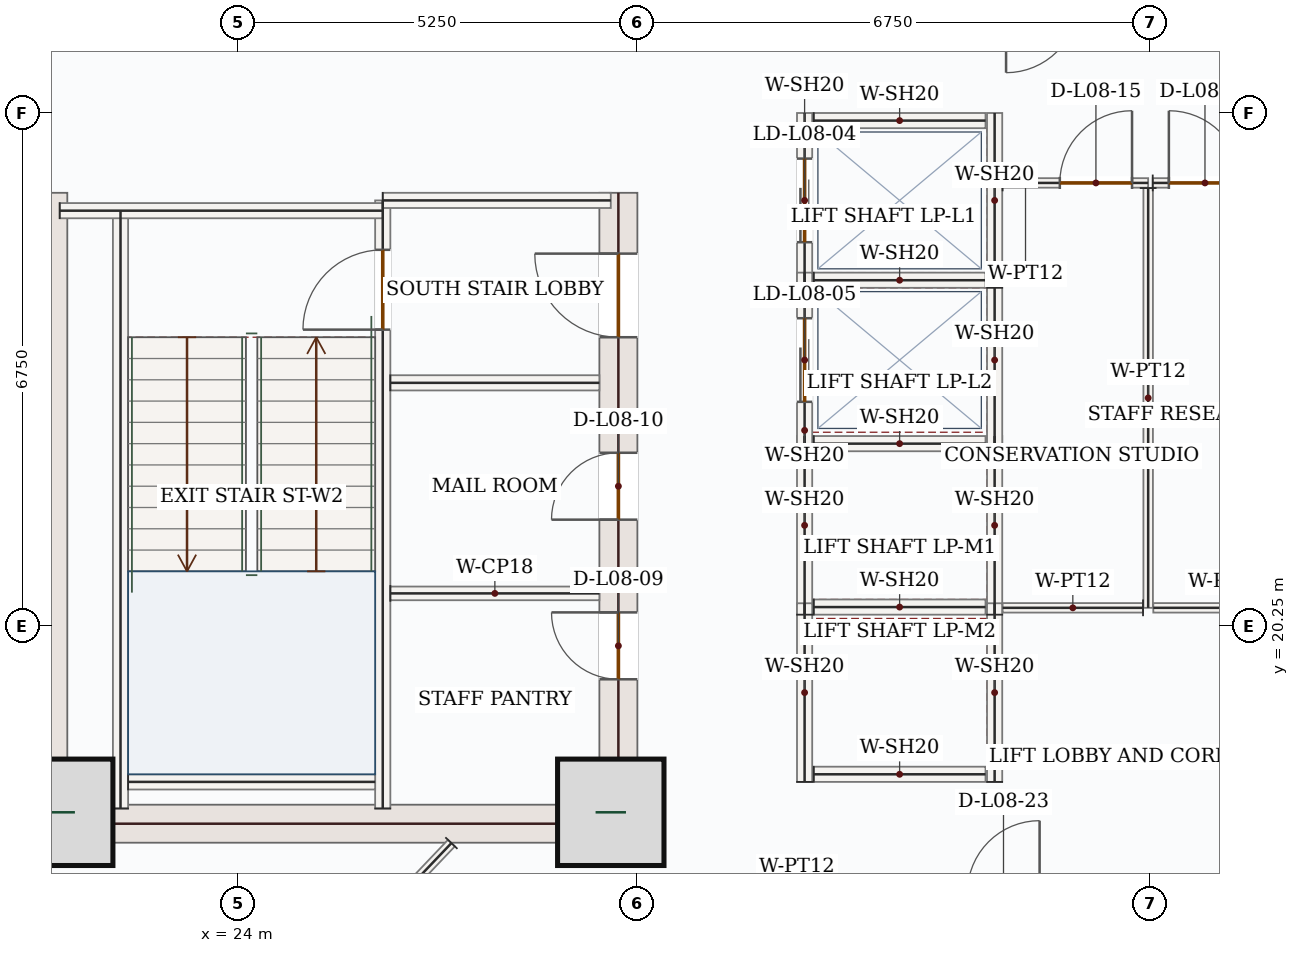
"""IFC4 building model, lengths in metres.
Left out: names, types, materials, properties, quantities, classifications, styles, units other than length and angle.
Written with IfcOpenShell. Run it as: python <this file> out.ifc"""

import sys

from ifc_helpers import new_model, si_unit, direction, frame, frame_2d, origin, origin_2d, place, context, subcontext, project, spatial, rectangle, extrude, source, transform, mapped, element, fill, save


model = new_model("IFC4")
c1 = context("Model", 3, precision=1e-05, world=origin(), true_north=direction((0.0, 1.0)))
c2 = subcontext(c1, "Body", "Model", "MODEL_VIEW")
j1 = project(units=[si_unit("LENGTHUNIT", "METRE"), si_unit("PLANEANGLEUNIT", "RADIAN")], contexts=[c1])
p1 = place(None, origin())
s1 = spatial("IfcSite", under=j1, at=p1, CompositionType="ELEMENT")
p2 = place(p1, origin())
s2 = spatial("IfcBuilding", under=s1, at=p2, CompositionType="ELEMENT")
p3 = place(p2, frame((0.0, 0.0, 41.7)))
s3 = spatial("IfcBuildingStorey", under=s2, at=p3, CompositionType="ELEMENT", Elevation=41.7)
m1 = source(origin(), c2, "Body", "SweptSolid", [
    extrude(rectangle(XDim=8.55, YDim=0.5, at=frame_2d((4.275, 0.0))), origin(), (0.0, 0.0, 1.0), 3.95),
])
p4 = place(p3, frame((21.5, 17.4, 0.0), z_axis=(0.0, 0.0, 1.0), x_axis=(0.0, 1.0, 0.0)))
e1 = element("IfcWall", 1, at=p4, inside=s3, PredefinedType="SHEAR", context=c2, shape_type="MappedRepresentation", body=[
    mapped(m1, transform((0.0, 0.0, 0.0), x_axis=(1.0, 0.0, 0.0), y_axis=(0.0, 1.0, 0.0), z_axis=(0.0, 0.0, 1.0), scale=1.0)),
])
p5 = place(p3, frame((29.0, 17.4, 0.0), z_axis=(0.0, 0.0, 1.0), x_axis=(0.0, 1.0, 0.0)))
e2 = element("IfcWall", 2, at=p5, inside=s3, PredefinedType="SHEAR", context=c2, shape_type="SweptSolid", body=[
    extrude(rectangle(XDim=8.55, YDim=0.5, at=frame_2d((4.275, 0.0))), origin(), (0.0, 0.0, 1.0), 3.95),
])
p6 = place(p5, frame((6.65, 0.0, 0.0)))
e3 = element("IfcOpeningElement", 3, at=p6, cuts=e2, PredefinedType="OPENING", context=c2, shape_type="SweptSolid", body=[
    extrude(rectangle(XDim=1.1, YDim=2.2, at=frame_2d((0.55, 1.1))), frame((0.0, 0.26, 0.0), z_axis=(0.0, -1.0, 0.0), x_axis=(1.0, 0.0, 0.0)), (0.0, 0.0, 1.0), 0.52),
])
p7 = place(p5, frame((2.15, 0.0, 0.0)))
e4 = element("IfcOpeningElement", 4, at=p7, cuts=e2, PredefinedType="OPENING", context=c2, shape_type="SweptSolid", body=[
    extrude(rectangle(XDim=0.88, YDim=2.1, at=frame_2d((0.44, 1.05))), frame((0.0, 0.26, 0.0), z_axis=(0.0, -1.0, 0.0), x_axis=(1.0, 0.0, 0.0)), (0.0, 0.0, 1.0), 0.52),
])
p8 = place(p5, frame((4.25, 0.0, 0.0)))
e5 = element("IfcOpeningElement", 5, at=p8, cuts=e2, PredefinedType="OPENING", context=c2, shape_type="SweptSolid", body=[
    extrude(rectangle(XDim=0.88, YDim=2.1, at=frame_2d((0.44, 1.05))), frame((0.0, 0.26, 0.0), z_axis=(0.0, -1.0, 0.0), x_axis=(1.0, 0.0, 0.0)), (0.0, 0.0, 1.0), 0.52),
])
m2 = source(origin(), c2, "Body", "SweptSolid", [
    extrude(rectangle(XDim=7.0, YDim=0.5, at=frame_2d((3.5, 0.0))), origin(), (0.0, 0.0, 1.0), 3.95),
])
p9 = place(p3, frame((21.75, 17.65, 0.0), z_axis=(0.0, 0.0, 1.0), x_axis=(1.0, 0.0, 0.0)))
e6 = element("IfcWall", 6, at=p9, inside=s3, PredefinedType="SHEAR", context=c2, shape_type="MappedRepresentation", body=[
    mapped(m2, transform((0.0, 0.0, 0.0), x_axis=(1.0, 0.0, 0.0), y_axis=(0.0, 1.0, 0.0), z_axis=(0.0, 0.0, 1.0), scale=1.0)),
])
m3 = source(origin(), c2, "Body", "SweptSolid", [
    extrude(rectangle(XDim=1.4, YDim=1.4, at=origin_2d()), origin(), (0.0, 0.0, 1.0), 4.2),
])
for number, where, z_axis, x_axis in (
    (7, (21.65, 17.8, 0.0), (0.0, 0.0, 1.0), (1.0, 0.0, 0.0)),
    (8, (28.9, 17.8, 0.0), (0.0, 0.0, 1.0), (1.0, 0.0, 0.0)),
):
    element("IfcColumn", number, at=place(p3, frame(where, z_axis=z_axis, x_axis=x_axis)), inside=s3, PredefinedType="COLUMN", context=c2, shape_type="MappedRepresentation", body=[
        mapped(m3, transform((0.0, 0.0, 0.0), x_axis=(1.0, 0.0, 0.0), y_axis=(0.0, 1.0, 0.0), z_axis=(0.0, 0.0, 1.0), scale=1.0)),
    ])
p10 = place(p3, frame((22.658, 14.74, 0.0), z_axis=(0.0, 0.0, 1.0), x_axis=(-0.707106781187, 0.707106781187, 0.0)))
e9 = element("IfcWall", 9, at=p10, inside=s3, PredefinedType="SOLIDWALL", context=c2, shape_type="SweptSolid", body=[
    extrude(rectangle(XDim=5.258, YDim=0.32, at=frame_2d((2.629, 0.0))), origin(), (0.0, 0.0, 1.0), 3.95),
])
p11 = place(p10, frame((1.429, 0.0, 0.85)))
e10 = element("IfcOpeningElement", 10, at=p11, cuts=e9, PredefinedType="OPENING", context=c2, shape_type="SweptSolid", body=[
    extrude(rectangle(XDim=2.4, YDim=1.8, at=frame_2d((1.2, 0.9))), frame((0.0, 0.17, 0.0), z_axis=(0.0, -1.0, 0.0), x_axis=(1.0, 0.0, 0.0)), (0.0, 0.0, 1.0), 0.34),
])
m4 = source(origin(), c2, "Body", "SweptSolid", [
    extrude(rectangle(XDim=7.87, YDim=0.2, at=frame_2d((3.935, 0.0))), origin(), (0.0, 0.0, 1.0), 3.95),
])
p12 = place(p3, frame((22.45, 17.85, 0.0), z_axis=(0.0, 0.0, 1.0), x_axis=(0.0, 1.0, 0.0)))
e11 = element("IfcWall", 11, at=p12, inside=s3, PredefinedType="SOLIDWALL", context=c2, shape_type="MappedRepresentation", body=[
    mapped(m4, transform((0.0, 0.0, 0.0), x_axis=(1.0, 0.0, 0.0), y_axis=(0.0, 1.0, 0.0), z_axis=(0.0, 0.0, 1.0), scale=1.0)),
])
p13 = place(p3, frame((25.9, 17.85, 0.0), z_axis=(0.0, 0.0, 1.0), x_axis=(0.0, 1.0, 0.0)))
e12 = element("IfcWall", 12, at=p13, inside=s3, PredefinedType="SOLIDWALL", context=c2, shape_type="SweptSolid", body=[
    extrude(rectangle(XDim=8.0, YDim=0.2, at=frame_2d((4.0, 0.0))), origin(), (0.0, 0.0, 1.0), 3.95),
])
p14 = place(p13, frame((6.3, 0.0, 0.0)))
e13 = element("IfcOpeningElement", 13, at=p14, cuts=e12, PredefinedType="OPENING", context=c2, shape_type="SweptSolid", body=[
    extrude(rectangle(XDim=1.05, YDim=2.15, at=frame_2d((0.525, 1.075))), frame((0.0, 0.11, 0.0), z_axis=(0.0, -1.0, 0.0), x_axis=(1.0, 0.0, 0.0)), (0.0, 0.0, 1.0), 0.22),
])
m5 = source(origin(), c2, "Body", "SweptSolid", [
    extrude(rectangle(XDim=4.25, YDim=0.2, at=frame_2d((2.125, 0.0))), origin(), (0.0, 0.0, 1.0), 3.95),
])
p15 = place(p3, frame((21.65, 25.715, 0.0), z_axis=(0.0, 0.0, 1.0), x_axis=(1.0, 0.0, 0.0)))
e14 = element("IfcWall", 14, at=p15, inside=s3, PredefinedType="SOLIDWALL", context=c2, shape_type="MappedRepresentation", body=[
    mapped(m5, transform((0.0, 0.0, 0.0), x_axis=(1.0, 0.0, 0.0), y_axis=(0.0, 1.0, 0.0), z_axis=(0.0, 0.0, 1.0), scale=1.0)),
])
m6 = source(origin(), c2, "Body", "SweptSolid", [
    extrude(rectangle(XDim=3.0, YDim=0.2, at=frame_2d((1.5, 0.0))), origin(), (0.0, 0.0, 1.0), 3.95),
])
p16 = place(p3, frame((25.9, 25.85, 0.0), z_axis=(0.0, 0.0, 1.0), x_axis=(1.0, 0.0, 0.0)))
e15 = element("IfcWall", 15, at=p16, inside=s3, PredefinedType="SOLIDWALL", context=c2, shape_type="MappedRepresentation", body=[
    mapped(m6, transform((0.0, 0.0, 0.0), x_axis=(1.0, 0.0, 0.0), y_axis=(0.0, 1.0, 0.0), z_axis=(0.0, 0.0, 1.0), scale=1.0)),
])
m7 = source(origin(), c2, "Body", "SweptSolid", [
    extrude(rectangle(XDim=3.25, YDim=0.2, at=frame_2d((1.625, 0.0))), origin(), (0.0, 0.0, 1.0), 3.95),
])
p17 = place(p3, frame((22.55, 18.2, 0.0), z_axis=(0.0, 0.0, 1.0), x_axis=(1.0, 0.0, 0.0)))
e16 = element("IfcWall", 16, at=p17, inside=s3, PredefinedType="SOLIDWALL", context=c2, shape_type="MappedRepresentation", body=[
    mapped(m7, transform((0.0, 0.0, 0.0), x_axis=(1.0, 0.0, 0.0), y_axis=(0.0, 1.0, 0.0), z_axis=(0.0, 0.0, 1.0), scale=1.0)),
])
m8 = source(origin(), c2, "Body", "SweptSolid", [
    extrude(rectangle(XDim=2.75, YDim=0.2, at=frame_2d((1.375, 0.0))), origin(), (0.0, 0.0, 1.0), 3.95),
])
p18 = place(p3, frame((26.0, 23.45, 0.0), z_axis=(0.0, 0.0, 1.0), x_axis=(1.0, 0.0, 0.0)))
e17 = element("IfcWall", 17, at=p18, inside=s3, PredefinedType="SOLIDWALL", context=c2, shape_type="MappedRepresentation", body=[
    mapped(m8, transform((0.0, 0.0, 0.0), x_axis=(1.0, 0.0, 0.0), y_axis=(0.0, 1.0, 0.0), z_axis=(0.0, 0.0, 1.0), scale=1.0)),
])
m9 = source(origin(), c2, "Body", "SweptSolid", [
    extrude(rectangle(XDim=2.75, YDim=0.18, at=frame_2d((1.375, 0.0))), origin(), (0.0, 0.0, 1.0), 3.95),
])
p19 = place(p3, frame((26.0, 20.68, 0.0), z_axis=(0.0, 0.0, 1.0), x_axis=(1.0, 0.0, 0.0)))
e18 = element("IfcWall", 18, at=p19, inside=s3, PredefinedType="PARTITIONING", context=c2, shape_type="MappedRepresentation", body=[
    mapped(m9, transform((0.0, 0.0, 0.0), x_axis=(1.0, 0.0, 0.0), y_axis=(0.0, 1.0, 0.0), z_axis=(0.0, 0.0, 1.0), scale=1.0)),
])
m10 = source(origin(), c2, "Body", "SweptSolid", [
    extrude(rectangle(XDim=2.35, YDim=0.2, at=frame_2d((1.175, 0.0))), origin(), (0.0, 0.0, 1.0), 3.95),
])
for number, where, z_axis, x_axis in (
    (19, (31.45, 20.4, 0.0), (0.0, 0.0, 1.0), (0.0, 1.0, 0.0)),
    (20, (33.95, 20.4, 0.0), (0.0, 0.0, 1.0), (0.0, 1.0, 0.0)),
):
    element("IfcWall", number, at=place(p3, frame(where, z_axis=z_axis, x_axis=x_axis)), inside=s3, PredefinedType="SOLIDWALL", context=c2, shape_type="MappedRepresentation", body=[
        mapped(m10, transform((0.0, 0.0, 0.0), x_axis=(1.0, 0.0, 0.0), y_axis=(0.0, 1.0, 0.0), z_axis=(0.0, 0.0, 1.0), scale=1.0)),
    ])
m11 = source(origin(), c2, "Body", "SweptSolid", [
    extrude(rectangle(XDim=2.26, YDim=0.2, at=frame_2d((1.13, 0.0))), origin(), (0.0, 0.0, 1.0), 3.95),
])
for number, where, z_axis, x_axis in (
    (21, (31.57, 20.5, 0.0), (0.0, 0.0, 1.0), (1.0, 0.0, 0.0)),
    (22, (31.57, 22.65, 0.0), (0.0, 0.0, 1.0), (1.0, 0.0, 0.0)),
):
    element("IfcWall", number, at=place(p3, frame(where, z_axis=z_axis, x_axis=x_axis)), inside=s3, PredefinedType="SOLIDWALL", context=c2, shape_type="MappedRepresentation", body=[
        mapped(m11, transform((0.0, 0.0, 0.0), x_axis=(1.0, 0.0, 0.0), y_axis=(0.0, 1.0, 0.0), z_axis=(0.0, 0.0, 1.0), scale=1.0)),
    ])
for number, where, z_axis, x_axis in (
    (23, (31.45, 18.2, 0.0), (0.0, 0.0, 1.0), (0.0, 1.0, 0.0)),
    (24, (33.95, 18.2, 0.0), (0.0, 0.0, 1.0), (0.0, 1.0, 0.0)),
):
    element("IfcWall", number, at=place(p3, frame(where, z_axis=z_axis, x_axis=x_axis)), inside=s3, PredefinedType="SOLIDWALL", context=c2, shape_type="MappedRepresentation", body=[
        mapped(m10, transform((0.0, 0.0, 0.0), x_axis=(1.0, 0.0, 0.0), y_axis=(0.0, 1.0, 0.0), z_axis=(0.0, 0.0, 1.0), scale=1.0)),
    ])
p20 = place(p3, frame((31.57, 18.3, 0.0), z_axis=(0.0, 0.0, 1.0), x_axis=(1.0, 0.0, 0.0)))
e25 = element("IfcWall", 25, at=p20, inside=s3, PredefinedType="SOLIDWALL", context=c2, shape_type="MappedRepresentation", body=[
    mapped(m11, transform((0.0, 0.0, 0.0), x_axis=(1.0, 0.0, 0.0), y_axis=(0.0, 1.0, 0.0), z_axis=(0.0, 0.0, 1.0), scale=1.0)),
])
p21 = place(p3, frame((31.45, 24.7, 0.0), z_axis=(0.0, 0.0, 1.0), x_axis=(0.0, 1.0, 0.0)))
e26 = element("IfcWall", 26, at=p21, inside=s3, PredefinedType="SOLIDWALL", context=c2, shape_type="SweptSolid", body=[
    extrude(rectangle(XDim=2.3, YDim=0.2, at=frame_2d((1.15, 0.0))), origin(), (0.0, 0.0, 1.0), 3.95),
])
p22 = place(p21, frame((0.6, 0.0, 0.0)))
e27 = element("IfcOpeningElement", 27, at=p22, cuts=e26, PredefinedType="OPENING", context=c2, shape_type="SweptSolid", body=[
    extrude(rectangle(XDim=1.1, YDim=2.15, at=frame_2d((0.55, 1.075))), frame((0.0, 0.11, 0.0), z_axis=(0.0, -1.0, 0.0), x_axis=(1.0, 0.0, 0.0)), (0.0, 0.0, 1.0), 0.22),
])
m12 = source(origin(), c2, "Body", "SweptSolid", [
    extrude(rectangle(XDim=2.3, YDim=0.2, at=frame_2d((1.15, 0.0))), origin(), (0.0, 0.0, 1.0), 3.95),
])
p23 = place(p3, frame((33.95, 24.7, 0.0), z_axis=(0.0, 0.0, 1.0), x_axis=(0.0, 1.0, 0.0)))
e28 = element("IfcWall", 28, at=p23, inside=s3, PredefinedType="SOLIDWALL", context=c2, shape_type="MappedRepresentation", body=[
    mapped(m12, transform((0.0, 0.0, 0.0), x_axis=(1.0, 0.0, 0.0), y_axis=(0.0, 1.0, 0.0), z_axis=(0.0, 0.0, 1.0), scale=1.0)),
])
for number, where, z_axis, x_axis in (
    (29, (31.57, 24.8, 0.0), (0.0, 0.0, 1.0), (1.0, 0.0, 0.0)),
    (30, (31.57, 26.9, 0.0), (0.0, 0.0, 1.0), (1.0, 0.0, 0.0)),
):
    element("IfcWall", number, at=place(p3, frame(where, z_axis=z_axis, x_axis=x_axis)), inside=s3, PredefinedType="SOLIDWALL", context=c2, shape_type="MappedRepresentation", body=[
        mapped(m11, transform((0.0, 0.0, 0.0), x_axis=(1.0, 0.0, 0.0), y_axis=(0.0, 1.0, 0.0), z_axis=(0.0, 0.0, 1.0), scale=1.0)),
    ])
p24 = place(p3, frame((31.45, 22.6, 0.0), z_axis=(0.0, 0.0, 1.0), x_axis=(0.0, 1.0, 0.0)))
e31 = element("IfcWall", 31, at=p24, inside=s3, PredefinedType="SOLIDWALL", context=c2, shape_type="SweptSolid", body=[
    extrude(rectangle(XDim=2.3, YDim=0.2, at=frame_2d((1.15, 0.0))), origin(), (0.0, 0.0, 1.0), 3.95),
])
p25 = place(p24, frame((0.6, 0.0, 0.0)))
e32 = element("IfcOpeningElement", 32, at=p25, cuts=e31, PredefinedType="OPENING", context=c2, shape_type="SweptSolid", body=[
    extrude(rectangle(XDim=1.1, YDim=2.15, at=frame_2d((0.55, 1.075))), frame((0.0, 0.11, 0.0), z_axis=(0.0, -1.0, 0.0), x_axis=(1.0, 0.0, 0.0)), (0.0, 0.0, 1.0), 0.22),
])
m13 = source(origin(), c2, "Body", "SweptSolid", [
    extrude(rectangle(XDim=2.3, YDim=0.2, at=frame_2d((1.15, 0.0))), origin(), (0.0, 0.0, 1.0), 3.95),
])
p26 = place(p3, frame((33.95, 22.6, 0.0), z_axis=(0.0, 0.0, 1.0), x_axis=(0.0, 1.0, 0.0)))
e33 = element("IfcWall", 33, at=p26, inside=s3, PredefinedType="SOLIDWALL", context=c2, shape_type="MappedRepresentation", body=[
    mapped(m13, transform((0.0, 0.0, 0.0), x_axis=(1.0, 0.0, 0.0), y_axis=(0.0, 1.0, 0.0), z_axis=(0.0, 0.0, 1.0), scale=1.0)),
])
p27 = place(p3, frame((34.055, 26.08, 0.0), z_axis=(0.0, 0.0, 1.0), x_axis=(1.0, 0.0, 0.0)))
e34 = element("IfcWall", 34, at=p27, inside=s3, PredefinedType="PARTITIONING", context=c2, shape_type="SweptSolid", body=[
    extrude(rectangle(XDim=1.915, YDim=0.125, at=frame_2d((0.958, 0.0))), origin(), (0.0, 0.0, 1.0), 3.95),
])
p28 = place(p27, frame((0.753, 0.0, 0.0)))
e35 = element("IfcOpeningElement", 35, at=p28, cuts=e34, PredefinedType="OPENING", context=c2, shape_type="SweptSolid", body=[
    extrude(rectangle(XDim=0.95, YDim=2.15, at=frame_2d((0.475, 1.075))), frame((0.0, 0.073, 0.0), z_axis=(0.0, -1.0, 0.0), x_axis=(1.0, 0.0, 0.0)), (0.0, 0.0, 1.0), 0.145),
])
m14 = source(origin(), c2, "Body", "SweptSolid", [
    extrude(rectangle(XDim=5.522, YDim=0.125, at=frame_2d((2.761, 0.0))), origin(), (0.0, 0.0, 1.0), 3.95),
])
p29 = place(p3, frame((35.97, 26.012, 0.0), z_axis=(0.0, 0.0, 1.0), x_axis=(0.0, -1.0, 0.0)))
e36 = element("IfcWall", 36, at=p29, inside=s3, PredefinedType="PARTITIONING", context=c2, shape_type="MappedRepresentation", body=[
    mapped(m14, transform((0.0, 0.0, 0.0), x_axis=(1.0, 0.0, 0.0), y_axis=(0.0, 1.0, 0.0), z_axis=(0.0, 0.0, 1.0), scale=1.0)),
])
m15 = source(origin(), c2, "Body", "SweptSolid", [
    extrude(rectangle(XDim=1.848, YDim=0.125, at=frame_2d((0.924, 0.0))), origin(), (0.0, 0.0, 1.0), 3.95),
])
p30 = place(p3, frame((35.903, 20.49, 0.0), z_axis=(0.0, 0.0, 1.0), x_axis=(-1.0, 0.0, 0.0)))
e37 = element("IfcWall", 37, at=p30, inside=s3, PredefinedType="PARTITIONING", context=c2, shape_type="MappedRepresentation", body=[
    mapped(m15, transform((0.0, 0.0, 0.0), x_axis=(1.0, 0.0, 0.0), y_axis=(0.0, 1.0, 0.0), z_axis=(0.0, 0.0, 1.0), scale=1.0)),
])
p31 = place(p3, frame((36.03, 26.08, 0.0), z_axis=(0.0, 0.0, 1.0), x_axis=(1.0, 0.0, 0.0)))
e38 = element("IfcWall", 38, at=p31, inside=s3, PredefinedType="PARTITIONING", context=c2, shape_type="SweptSolid", body=[
    extrude(rectangle(XDim=1.915, YDim=0.125, at=frame_2d((0.958, 0.0))), origin(), (0.0, 0.0, 1.0), 3.95),
])
p32 = place(p31, frame((0.212, 0.0, 0.0)))
e39 = element("IfcOpeningElement", 39, at=p32, cuts=e38, PredefinedType="OPENING", context=c2, shape_type="SweptSolid", body=[
    extrude(rectangle(XDim=0.95, YDim=2.15, at=frame_2d((0.475, 1.075))), frame((0.0, 0.073, 0.0), z_axis=(0.0, -1.0, 0.0), x_axis=(1.0, 0.0, 0.0)), (0.0, 0.0, 1.0), 0.145),
])
m16 = source(origin(), c2, "Body", "SweptSolid", [
    extrude(rectangle(XDim=1.907, YDim=0.125, at=frame_2d((0.954, 0.0))), origin(), (0.0, 0.0, 1.0), 3.95),
])
p33 = place(p3, frame((37.945, 20.49, 0.0), z_axis=(0.0, 0.0, 1.0), x_axis=(-1.0, 0.0, 0.0)))
e40 = element("IfcWall", 40, at=p33, inside=s3, PredefinedType="PARTITIONING", context=c2, shape_type="MappedRepresentation", body=[
    mapped(m16, transform((0.0, 0.0, 0.0), x_axis=(1.0, 0.0, 0.0), y_axis=(0.0, 1.0, 0.0), z_axis=(0.0, 0.0, 1.0), scale=1.0)),
])
m17 = source(origin(), c2, "Body", "SweptSolid", [
    extrude(rectangle(XDim=3.438, YDim=0.125, at=frame_2d((1.719, 0.0))), origin(), (0.0, 0.0, 1.0), 3.95),
])
p34 = place(p3, frame((26.803, 17.395, 0.0), z_axis=(0.0, 0.0, 1.0), x_axis=(-0.689493786127, -0.724291597972, 0.0)))
e41 = element("IfcWall", 41, at=p34, inside=s3, PredefinedType="PARTITIONING", context=c2, shape_type="MappedRepresentation", body=[
    mapped(m17, transform((0.0, 0.0, 0.0), x_axis=(1.0, 0.0, 0.0), y_axis=(0.0, 1.0, 0.0), z_axis=(0.0, 0.0, 1.0), scale=1.0)),
])
m18 = source(origin(), c2, "Body", "SweptSolid", [
    extrude(rectangle(XDim=2.4, YDim=1.8, at=frame_2d((1.2, 0.9))), frame((0.0, 0.03, 0.0), z_axis=(0.0, -1.0, 0.0), x_axis=(1.0, 0.0, 0.0)), (0.0, 0.0, 1.0), 0.06),
])
p35 = place(p11, origin())
e42 = element("IfcWindow", 42, at=p35, inside=s3, PartitioningType="DOUBLE_PANEL_VERTICAL", PredefinedType="WINDOW", context=c2, shape_type="MappedRepresentation", body=[
    mapped(m18, transform((0.0, 0.0, 0.0), x_axis=(1.0, 0.0, 0.0), y_axis=(0.0, 1.0, 0.0), z_axis=(0.0, 0.0, 1.0), scale=1.0)),
])
fill(e10, e42)
m19 = source(origin(), c2, "Body", "SweptSolid", [
    extrude(rectangle(XDim=1.05, YDim=2.15, at=frame_2d((0.525, 1.075))), frame((0.0, 0.025, 0.0), z_axis=(0.0, -1.0, 0.0), x_axis=(1.0, 0.0, 0.0)), (0.0, 0.0, 1.0), 0.05),
])
p36 = place(p14, origin())
e43 = element("IfcDoor", 43, at=p36, inside=s3, OperationType="SINGLE_SWING_LEFT", PredefinedType="DOOR", context=c2, shape_type="MappedRepresentation", body=[
    mapped(m19, transform((0.0, 0.0, 0.0), x_axis=(1.0, 0.0, 0.0), y_axis=(0.0, 1.0, 0.0), z_axis=(0.0, 0.0, 1.0), scale=1.0)),
])
fill(e13, e43)
m20 = source(origin(), c2, "Body", "SweptSolid", [
    extrude(rectangle(XDim=1.1, YDim=2.2, at=frame_2d((0.55, 1.1))), frame((0.0, 0.025, 0.0), z_axis=(0.0, -1.0, 0.0), x_axis=(1.0, 0.0, 0.0)), (0.0, 0.0, 1.0), 0.05),
])
p37 = place(p6, origin())
e44 = element("IfcDoor", 44, at=p37, inside=s3, OperationType="SINGLE_SWING_RIGHT", PredefinedType="DOOR", context=c2, shape_type="MappedRepresentation", body=[
    mapped(m20, transform((0.0, 0.0, 0.0), x_axis=(1.0, 0.0, 0.0), y_axis=(0.0, 1.0, 0.0), z_axis=(0.0, 0.0, 1.0), scale=1.0)),
])
fill(e3, e44)
m21 = source(origin(), c2, "Body", "SweptSolid", [
    extrude(rectangle(XDim=0.88, YDim=2.1, at=frame_2d((0.44, 1.05))), frame((0.0, 0.025, 0.0), z_axis=(0.0, -1.0, 0.0), x_axis=(1.0, 0.0, 0.0)), (0.0, 0.0, 1.0), 0.05),
])
p38 = place(p7, origin())
e45 = element("IfcDoor", 45, at=p38, inside=s3, OperationType="SINGLE_SWING_RIGHT", PredefinedType="DOOR", context=c2, shape_type="MappedRepresentation", body=[
    mapped(m21, transform((0.0, 0.0, 0.0), x_axis=(1.0, 0.0, 0.0), y_axis=(0.0, 1.0, 0.0), z_axis=(0.0, 0.0, 1.0), scale=1.0)),
])
fill(e4, e45)
p39 = place(p8, origin())
e46 = element("IfcDoor", 46, at=p39, inside=s3, OperationType="SINGLE_SWING_LEFT", PredefinedType="DOOR", context=c2, shape_type="MappedRepresentation", body=[
    mapped(m21, transform((0.0, 0.0, 0.0), x_axis=(1.0, 0.0, 0.0), y_axis=(0.0, 1.0, 0.0), z_axis=(0.0, 0.0, 1.0), scale=1.0)),
])
fill(e5, e46)
m22 = source(origin(), c2, "Body", "SweptSolid", [
    extrude(rectangle(XDim=1.1, YDim=2.15, at=frame_2d((0.55, 1.075))), frame((0.0, 0.025, 0.0), z_axis=(0.0, -1.0, 0.0), x_axis=(1.0, 0.0, 0.0)), (0.0, 0.0, 1.0), 0.05),
])
p40 = place(p22, origin())
e47 = element("IfcDoor", 47, at=p40, inside=s3, OperationType="DOUBLE_DOOR_SLIDING", PredefinedType="DOOR", context=c2, shape_type="MappedRepresentation", body=[
    mapped(m22, transform((0.0, 0.0, 0.0), x_axis=(1.0, 0.0, 0.0), y_axis=(0.0, 1.0, 0.0), z_axis=(0.0, 0.0, 1.0), scale=1.0)),
])
fill(e27, e47)
p41 = place(p25, origin())
e48 = element("IfcDoor", 48, at=p41, inside=s3, OperationType="DOUBLE_DOOR_SLIDING", PredefinedType="DOOR", context=c2, shape_type="MappedRepresentation", body=[
    mapped(m22, transform((0.0, 0.0, 0.0), x_axis=(1.0, 0.0, 0.0), y_axis=(0.0, 1.0, 0.0), z_axis=(0.0, 0.0, 1.0), scale=1.0)),
])
fill(e32, e48)
m23 = source(origin(), c2, "Body", "SweptSolid", [
    extrude(rectangle(XDim=0.95, YDim=2.15, at=frame_2d((0.475, 1.075))), frame((0.0, 0.025, 0.0), z_axis=(0.0, -1.0, 0.0), x_axis=(1.0, 0.0, 0.0)), (0.0, 0.0, 1.0), 0.05),
])
p42 = place(p28, origin())
e49 = element("IfcDoor", 49, at=p42, inside=s3, OperationType="SINGLE_SWING_RIGHT", PredefinedType="DOOR", context=c2, shape_type="MappedRepresentation", body=[
    mapped(m23, transform((0.0, 0.0, 0.0), x_axis=(1.0, 0.0, 0.0), y_axis=(0.0, 1.0, 0.0), z_axis=(0.0, 0.0, 1.0), scale=1.0)),
])
fill(e35, e49)
p43 = place(p32, origin())
e50 = element("IfcDoor", 50, at=p43, inside=s3, OperationType="SINGLE_SWING_LEFT", PredefinedType="DOOR", context=c2, shape_type="MappedRepresentation", body=[
    mapped(m23, transform((0.0, 0.0, 0.0), x_axis=(1.0, 0.0, 0.0), y_axis=(0.0, 1.0, 0.0), z_axis=(0.0, 0.0, 1.0), scale=1.0)),
])
fill(e39, e50)
save(model, sys.argv[1])
